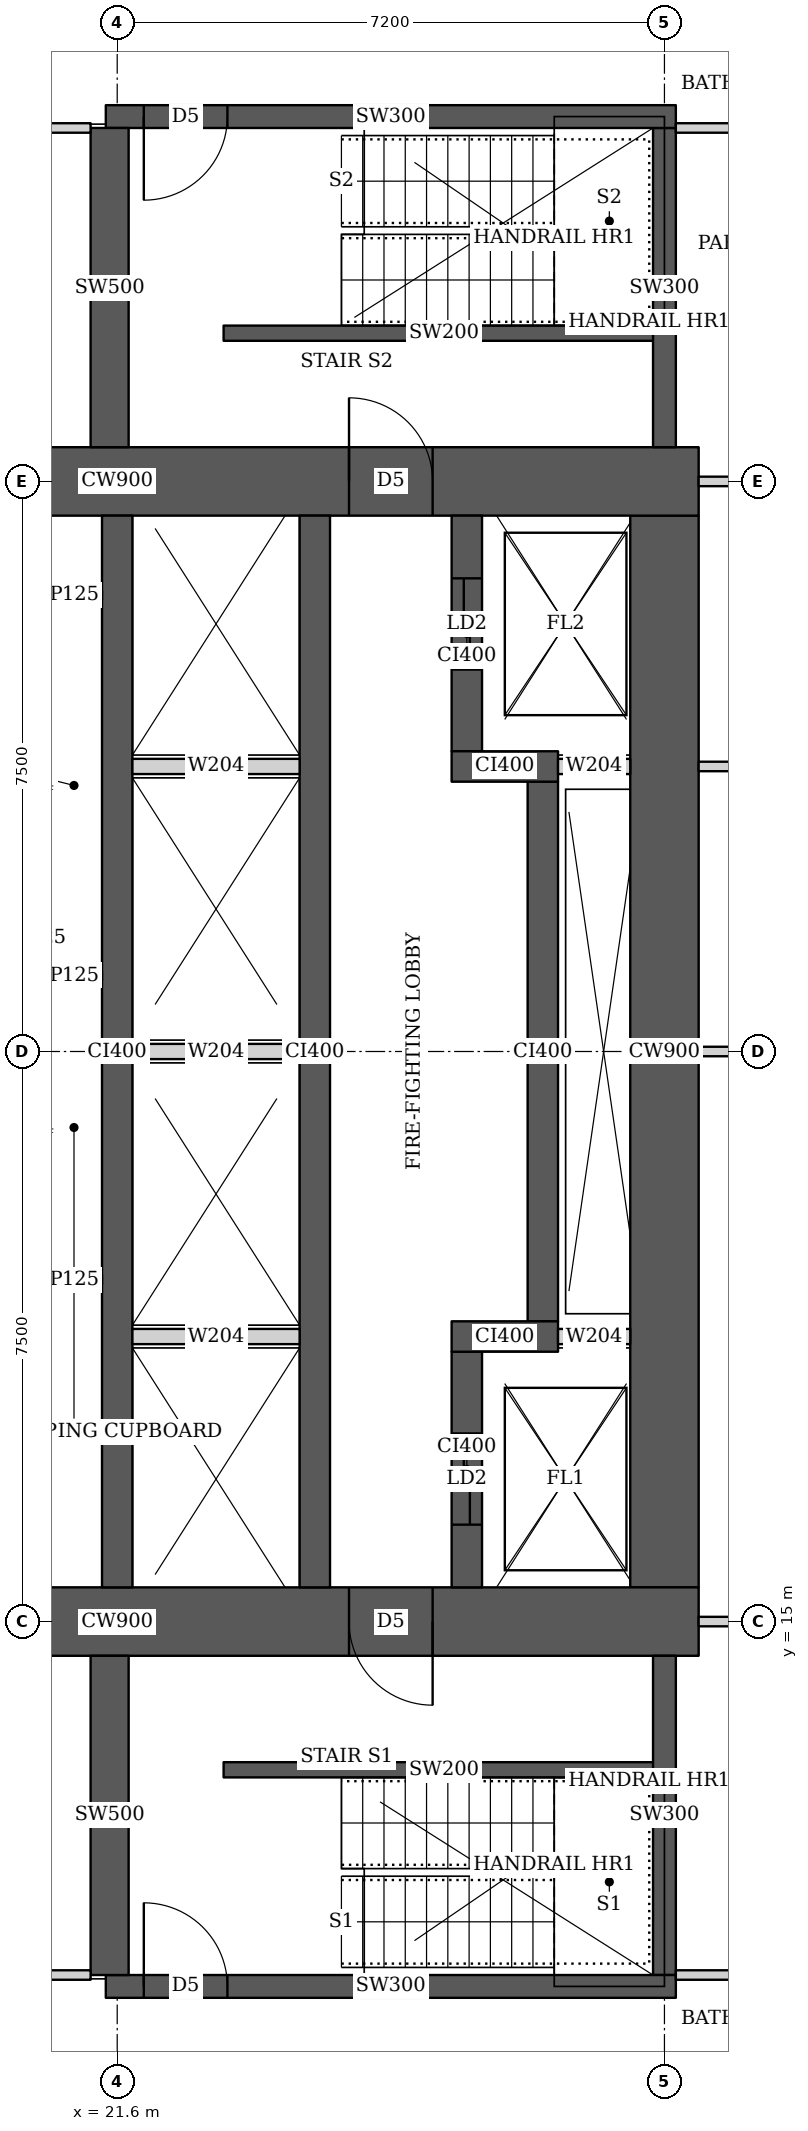
"""IFC4 building model, lengths in metres.
Left out: names, types, materials, properties, quantities, classifications, styles, units other than length and angle.
Written with IfcOpenShell. Run it as: python <this file> out.ifc"""

import sys

from ifc_helpers import new_model, si_unit, direction, frame, frame_2d, origin, place, context, subcontext, project, spatial, rectangle, extrude, element, fill, save


model = new_model("IFC4")
c1 = context("Model", 3, precision=1e-05, world=origin(), true_north=direction((0.0, 1.0)))
c2 = subcontext(c1, "Body", "Model", "MODEL_VIEW")
j1 = project(units=[si_unit("LENGTHUNIT", "METRE"), si_unit("PLANEANGLEUNIT", "RADIAN")], contexts=[c1])
p1 = place(None, origin())
s1 = spatial("IfcSite", under=j1, at=p1, CompositionType="ELEMENT")
p2 = place(p1, origin())
s2 = spatial("IfcBuilding", under=s1, at=p2, CompositionType="ELEMENT")
p3 = place(p2, frame((0.0, 0.0, 89.15)))
s3 = spatial("IfcBuildingStorey", under=s2, at=p3, CompositionType="ELEMENT", Elevation=89.15)
p4 = place(p3, frame((13.95, 15.0, 0.0), z_axis=(0.0, 0.0, 1.0), x_axis=(1.0, 0.0, 0.0)))
e1 = element("IfcWall", 1, at=p4, inside=s3, PredefinedType="SHEAR", context=c2, shape_type="SweptSolid", body=[
    extrude(rectangle(XDim=15.3, YDim=0.9, at=frame_2d((7.65, 0.0))), origin(), (0.0, 0.0, 1.0), 3.75),
])
p5 = place(p4, frame((4.45, 0.0, 0.0)))
e2 = element("IfcOpeningElement", 2, at=p5, cuts=e1, PredefinedType="OPENING", context=c2, shape_type="SweptSolid", body=[
    extrude(rectangle(XDim=1.8, YDim=2.1, at=frame_2d((0.9, 1.05))), frame((0.0, 0.46, 0.0), z_axis=(0.0, -1.0, 0.0), x_axis=(1.0, 0.0, 0.0)), (0.0, 0.0, 1.0), 0.92),
])
p6 = place(p4, frame((10.7, 0.0, 0.0)))
e3 = element("IfcOpeningElement", 3, at=p6, cuts=e1, PredefinedType="OPENING", context=c2, shape_type="SweptSolid", body=[
    extrude(rectangle(XDim=1.1, YDim=2.1, at=frame_2d((0.55, 1.05))), frame((0.0, 0.46, 0.0), z_axis=(0.0, -1.0, 0.0), x_axis=(1.0, 0.0, 0.0)), (0.0, 0.0, 1.0), 0.92),
])
p7 = place(p3, frame((13.95, 30.0, 0.0), z_axis=(0.0, 0.0, 1.0), x_axis=(1.0, 0.0, 0.0)))
e4 = element("IfcWall", 4, at=p7, inside=s3, PredefinedType="SHEAR", context=c2, shape_type="SweptSolid", body=[
    extrude(rectangle(XDim=15.3, YDim=0.9, at=frame_2d((7.65, 0.0))), origin(), (0.0, 0.0, 1.0), 3.75),
])
p8 = place(p7, frame((4.45, 0.0, 0.0)))
e5 = element("IfcOpeningElement", 5, at=p8, cuts=e4, PredefinedType="OPENING", context=c2, shape_type="SweptSolid", body=[
    extrude(rectangle(XDim=1.8, YDim=2.1, at=frame_2d((0.9, 1.05))), frame((0.0, 0.46, 0.0), z_axis=(0.0, -1.0, 0.0), x_axis=(1.0, 0.0, 0.0)), (0.0, 0.0, 1.0), 0.92),
])
p9 = place(p7, frame((10.7, 0.0, 0.0)))
e6 = element("IfcOpeningElement", 6, at=p9, cuts=e4, PredefinedType="OPENING", context=c2, shape_type="SweptSolid", body=[
    extrude(rectangle(XDim=1.1, YDim=2.1, at=frame_2d((0.55, 1.05))), frame((0.0, 0.46, 0.0), z_axis=(0.0, -1.0, 0.0), x_axis=(1.0, 0.0, 0.0)), (0.0, 0.0, 1.0), 0.92),
])
p10 = place(p3, frame((28.8, 15.45, 0.0), z_axis=(0.0, 0.0, 1.0), x_axis=(0.0, 1.0, 0.0)))
e7 = element("IfcWall", 7, at=p10, inside=s3, PredefinedType="SHEAR", context=c2, shape_type="SweptSolid", body=[
    extrude(rectangle(XDim=14.1, YDim=0.9, at=frame_2d((7.05, 0.0))), origin(), (0.0, 0.0, 1.0), 3.75),
])
for number, where, z_axis, x_axis in (
    (8, (21.6, 15.45, 0.0), (0.0, 0.0, 1.0), (0.0, 1.0, 0.0)),
    (9, (24.2, 15.45, 0.0), (0.0, 0.0, 1.0), (0.0, 1.0, 0.0)),
):
    element("IfcWall", number, at=place(p3, frame(where, z_axis=z_axis, x_axis=x_axis)), inside=s3, PredefinedType="SHEAR", context=c2, shape_type="SweptSolid", body=[
        extrude(rectangle(XDim=14.1, YDim=0.4, at=frame_2d((7.05, 0.0))), origin(), (0.0, 0.0, 1.0), 3.75),
    ])
p11 = place(p3, frame((26.2, 15.45, 0.0), z_axis=(0.0, 0.0, 1.0), x_axis=(0.0, 1.0, 0.0)))
e10 = element("IfcWall", 10, at=p11, inside=s3, PredefinedType="SHEAR", context=c2, shape_type="SweptSolid", body=[
    extrude(rectangle(XDim=3.1, YDim=0.4, at=frame_2d((1.55, 0.0))), origin(), (0.0, 0.0, 1.0), 3.75),
])
p12 = place(p11, frame((0.825, 0.0, 0.0)))
e11 = element("IfcOpeningElement", 11, at=p12, cuts=e10, PredefinedType="OPENING", context=c2, shape_type="SweptSolid", body=[
    extrude(rectangle(XDim=1.2, YDim=2.1, at=frame_2d((0.6, 1.05))), frame((0.0, 0.21, 0.0), z_axis=(0.0, -1.0, 0.0), x_axis=(1.0, 0.0, 0.0)), (0.0, 0.0, 1.0), 0.42),
])
p13 = place(p3, frame((26.0, 18.75, 0.0), z_axis=(0.0, 0.0, 1.0), x_axis=(1.0, 0.0, 0.0)))
e12 = element("IfcWall", 12, at=p13, inside=s3, PredefinedType="SHEAR", context=c2, shape_type="SweptSolid", body=[
    extrude(rectangle(XDim=1.4, YDim=0.4, at=frame_2d((0.7, 0.0))), origin(), (0.0, 0.0, 1.0), 3.75),
])
p14 = place(p3, frame((27.2, 18.95, 0.0), z_axis=(0.0, 0.0, 1.0), x_axis=(0.0, 1.0, 0.0)))
e13 = element("IfcWall", 13, at=p14, inside=s3, PredefinedType="SHEAR", context=c2, shape_type="SweptSolid", body=[
    extrude(rectangle(XDim=7.1, YDim=0.4, at=frame_2d((3.55, 0.0))), origin(), (0.0, 0.0, 1.0), 3.75),
])
p15 = place(p3, frame((26.0, 26.25, 0.0), z_axis=(0.0, 0.0, 1.0), x_axis=(1.0, 0.0, 0.0)))
e14 = element("IfcWall", 14, at=p15, inside=s3, PredefinedType="SHEAR", context=c2, shape_type="SweptSolid", body=[
    extrude(rectangle(XDim=1.4, YDim=0.4, at=frame_2d((0.7, 0.0))), origin(), (0.0, 0.0, 1.0), 3.75),
])
p16 = place(p3, frame((26.2, 26.45, 0.0), z_axis=(0.0, 0.0, 1.0), x_axis=(0.0, 1.0, 0.0)))
e15 = element("IfcWall", 15, at=p16, inside=s3, PredefinedType="SHEAR", context=c2, shape_type="SweptSolid", body=[
    extrude(rectangle(XDim=3.1, YDim=0.4, at=frame_2d((1.55, 0.0))), origin(), (0.0, 0.0, 1.0), 3.75),
])
p17 = place(p16, frame((1.075, 0.0, 0.0)))
e16 = element("IfcOpeningElement", 16, at=p17, cuts=e15, PredefinedType="OPENING", context=c2, shape_type="SweptSolid", body=[
    extrude(rectangle(XDim=1.2, YDim=2.1, at=frame_2d((0.6, 1.05))), frame((0.0, 0.21, 0.0), z_axis=(0.0, -1.0, 0.0), x_axis=(1.0, 0.0, 0.0)), (0.0, 0.0, 1.0), 0.42),
])
p18 = place(p3, frame((21.45, 10.2, 0.0), z_axis=(0.0, 0.0, 1.0), x_axis=(1.0, 0.0, 0.0)))
e17 = element("IfcWall", 17, at=p18, inside=s3, PredefinedType="SHEAR", context=c2, shape_type="SweptSolid", body=[
    extrude(rectangle(XDim=7.5, YDim=0.3, at=frame_2d((3.75, 0.0))), origin(), (0.0, 0.0, 1.0), 3.75),
])
p19 = place(p18, frame((0.5, 0.0, 0.0)))
e18 = element("IfcOpeningElement", 18, at=p19, cuts=e17, PredefinedType="OPENING", context=c2, shape_type="SweptSolid", body=[
    extrude(rectangle(XDim=1.1, YDim=2.1, at=frame_2d((0.55, 1.05))), frame((0.0, 0.16, 0.0), z_axis=(0.0, -1.0, 0.0), x_axis=(1.0, 0.0, 0.0)), (0.0, 0.0, 1.0), 0.32),
])
p20 = place(p3, frame((21.5, 10.35, 0.0), z_axis=(0.0, 0.0, 1.0), x_axis=(0.0, 1.0, 0.0)))
e19 = element("IfcWall", 19, at=p20, inside=s3, PredefinedType="SHEAR", context=c2, shape_type="SweptSolid", body=[
    extrude(rectangle(XDim=4.2, YDim=0.5, at=frame_2d((2.1, 0.0))), origin(), (0.0, 0.0, 1.0), 3.75),
])
p21 = place(p3, frame((28.8, 10.35, 0.0), z_axis=(0.0, 0.0, 1.0), x_axis=(0.0, 1.0, 0.0)))
e20 = element("IfcWall", 20, at=p21, inside=s3, PredefinedType="SHEAR", context=c2, shape_type="SweptSolid", body=[
    extrude(rectangle(XDim=4.2, YDim=0.3, at=frame_2d((2.1, 0.0))), origin(), (0.0, 0.0, 1.0), 3.75),
])
p22 = place(p3, frame((21.45, 34.8, 0.0), z_axis=(0.0, 0.0, 1.0), x_axis=(1.0, 0.0, 0.0)))
e21 = element("IfcWall", 21, at=p22, inside=s3, PredefinedType="SHEAR", context=c2, shape_type="SweptSolid", body=[
    extrude(rectangle(XDim=7.5, YDim=0.3, at=frame_2d((3.75, 0.0))), origin(), (0.0, 0.0, 1.0), 3.75),
])
p23 = place(p22, frame((0.5, 0.0, 0.0)))
e22 = element("IfcOpeningElement", 22, at=p23, cuts=e21, PredefinedType="OPENING", context=c2, shape_type="SweptSolid", body=[
    extrude(rectangle(XDim=1.1, YDim=2.1, at=frame_2d((0.55, 1.05))), frame((0.0, 0.16, 0.0), z_axis=(0.0, -1.0, 0.0), x_axis=(1.0, 0.0, 0.0)), (0.0, 0.0, 1.0), 0.32),
])
p24 = place(p3, frame((21.5, 30.45, 0.0), z_axis=(0.0, 0.0, 1.0), x_axis=(0.0, 1.0, 0.0)))
e23 = element("IfcWall", 23, at=p24, inside=s3, PredefinedType="SHEAR", context=c2, shape_type="SweptSolid", body=[
    extrude(rectangle(XDim=4.2, YDim=0.5, at=frame_2d((2.1, 0.0))), origin(), (0.0, 0.0, 1.0), 3.75),
])
p25 = place(p3, frame((28.8, 30.45, 0.0), z_axis=(0.0, 0.0, 1.0), x_axis=(0.0, 1.0, 0.0)))
e24 = element("IfcWall", 24, at=p25, inside=s3, PredefinedType="SHEAR", context=c2, shape_type="SweptSolid", body=[
    extrude(rectangle(XDim=4.2, YDim=0.3, at=frame_2d((2.1, 0.0))), origin(), (0.0, 0.0, 1.0), 3.75),
])
p26 = place(p3, frame((10.413, 10.35, 0.0), z_axis=(0.0, 0.0, 1.0), x_axis=(1.0, 0.0, 0.0)))
e25 = element("IfcWall", 25, at=p26, inside=s3, PredefinedType="PARTITIONING", context=c2, shape_type="SweptSolid", body=[
    extrude(rectangle(XDim=10.837, YDim=0.125, at=frame_2d((5.418, 0.0))), origin(), (0.0, 0.0, 1.0), 3.5),
])
p27 = place(p26, frame((7.582, 0.0, 0.0)))
e26 = element("IfcOpeningElement", 26, at=p27, cuts=e25, PredefinedType="OPENING", context=c2, shape_type="SweptSolid", body=[
    extrude(rectangle(XDim=1.8, YDim=2.1, at=frame_2d((0.9, 1.05))), frame((0.0, 0.073, 0.0), z_axis=(0.0, -1.0, 0.0), x_axis=(1.0, 0.0, 0.0)), (0.0, 0.0, 1.0), 0.145),
])
p28 = place(p3, frame((10.413, 34.65, 0.0), z_axis=(0.0, 0.0, 1.0), x_axis=(1.0, 0.0, 0.0)))
e27 = element("IfcWall", 27, at=p28, inside=s3, PredefinedType="PARTITIONING", context=c2, shape_type="SweptSolid", body=[
    extrude(rectangle(XDim=10.837, YDim=0.125, at=frame_2d((5.418, 0.0))), origin(), (0.0, 0.0, 1.0), 3.5),
])
p29 = place(p28, frame((7.487, 0.0, 0.0)))
e28 = element("IfcOpeningElement", 28, at=p29, cuts=e27, PredefinedType="OPENING", context=c2, shape_type="SweptSolid", body=[
    extrude(rectangle(XDim=1.8, YDim=2.1, at=frame_2d((0.9, 1.05))), frame((0.0, 0.073, 0.0), z_axis=(0.0, -1.0, 0.0), x_axis=(1.0, 0.0, 0.0)), (0.0, 0.0, 1.0), 0.145),
])
p30 = place(p3, frame((28.95, 10.35, 0.0), z_axis=(0.0, 0.0, 1.0), x_axis=(1.0, 0.0, 0.0)))
e29 = element("IfcWall", 29, at=p30, inside=s3, PredefinedType="PARTITIONING", context=c2, shape_type="SweptSolid", body=[
    extrude(rectangle(XDim=8.886, YDim=0.125, at=frame_2d((4.443, 0.0))), origin(), (0.0, 0.0, 1.0), 3.5),
])
p31 = place(p3, frame((28.95, 34.65, 0.0), z_axis=(0.0, 0.0, 1.0), x_axis=(1.0, 0.0, 0.0)))
e30 = element("IfcWall", 30, at=p31, inside=s3, PredefinedType="PARTITIONING", context=c2, shape_type="SweptSolid", body=[
    extrude(rectangle(XDim=4.381, YDim=0.125, at=frame_2d((2.19, 0.0))), origin(), (0.0, 0.0, 1.0), 3.5),
])
p32 = place(p3, frame((29.25, 15.0, 0.0), z_axis=(0.0, 0.0, 1.0), x_axis=(1.0, 0.0, 0.0)))
e31 = element("IfcWall", 31, at=p32, inside=s3, PredefinedType="PARTITIONING", context=c2, shape_type="SweptSolid", body=[
    extrude(rectangle(XDim=5.949, YDim=0.125, at=frame_2d((2.975, 0.0))), origin(), (0.0, 0.0, 1.0), 3.5),
])
p33 = place(p3, frame((29.25, 22.5, 0.0), z_axis=(0.0, 0.0, 1.0), x_axis=(1.0, 0.0, 0.0)))
e32 = element("IfcWall", 32, at=p33, inside=s3, PredefinedType="PARTITIONING", context=c2, shape_type="SweptSolid", body=[
    extrude(rectangle(XDim=2.949, YDim=0.125, at=frame_2d((1.475, 0.0))), origin(), (0.0, 0.0, 1.0), 3.5),
])
p34 = place(p3, frame((29.25, 26.25, 0.0), z_axis=(0.0, 0.0, 1.0), x_axis=(1.0, 0.0, 0.0)))
e33 = element("IfcWall", 33, at=p34, inside=s3, PredefinedType="PARTITIONING", context=c2, shape_type="SweptSolid", body=[
    extrude(rectangle(XDim=5.583, YDim=0.125, at=frame_2d((2.792, 0.0))), origin(), (0.0, 0.0, 1.0), 3.5),
])
p35 = place(p3, frame((29.25, 30.0, 0.0), z_axis=(0.0, 0.0, 1.0), x_axis=(1.0, 0.0, 0.0)))
e34 = element("IfcWall", 34, at=p35, inside=s3, PredefinedType="PARTITIONING", context=c2, shape_type="SweptSolid", body=[
    extrude(rectangle(XDim=2.949, YDim=0.125, at=frame_2d((1.475, 0.0))), origin(), (0.0, 0.0, 1.0), 3.5),
])
for number, where, z_axis, x_axis in (
    (35, (20.663, 19.5, 0.0), (0.0, 0.0, 1.0), (1.0, 0.0, 0.0)),
    (36, (20.663, 28.5, 0.0), (0.0, 0.0, 1.0), (1.0, 0.0, 0.0)),
    (37, (20.663, 23.5, 0.0), (0.0, 0.0, 1.0), (1.0, 0.0, 0.0)),
):
    element("IfcWall", number, at=place(p3, frame(where, z_axis=z_axis, x_axis=x_axis)), inside=s3, PredefinedType="PARTITIONING", context=c2, shape_type="SweptSolid", body=[
        extrude(rectangle(XDim=0.737, YDim=0.125, at=frame_2d((0.368, 0.0))), origin(), (0.0, 0.0, 1.0), 3.5),
    ])
for number, where, z_axis, x_axis in (
    (38, (23.0, 13.05, 0.0), (0.0, 0.0, 1.0), (1.0, 0.0, 0.0)),
    (39, (23.0, 31.95, 0.0), (0.0, 0.0, 1.0), (1.0, 0.0, 0.0)),
):
    element("IfcWall", number, at=place(p3, frame(where, z_axis=z_axis, x_axis=x_axis)), inside=s3, PredefinedType="SHEAR", context=c2, shape_type="SweptSolid", body=[
        extrude(rectangle(XDim=5.8, YDim=0.2, at=frame_2d((2.9, 0.0))), origin(), (0.0, 0.0, 1.0), 3.75),
    ])
for number, where, z_axis, x_axis in (
    (40, (21.8, 18.75, 0.0), (0.0, 0.0, 1.0), (1.0, 0.0, 0.0)),
    (41, (21.8, 22.5, 0.0), (0.0, 0.0, 1.0), (1.0, 0.0, 0.0)),
    (42, (21.8, 26.25, 0.0), (0.0, 0.0, 1.0), (1.0, 0.0, 0.0)),
):
    element("IfcWall", number, at=place(p3, frame(where, z_axis=z_axis, x_axis=x_axis)), inside=s3, PredefinedType="SOLIDWALL", context=c2, shape_type="SweptSolid", body=[
        extrude(rectangle(XDim=2.2, YDim=0.2, at=frame_2d((1.1, 0.0))), origin(), (0.0, 0.0, 1.0), 3.5),
    ])
for number, where, z_axis, x_axis in (
    (43, (27.4, 18.75, 0.0), (0.0, 0.0, 1.0), (1.0, 0.0, 0.0)),
    (44, (27.4, 26.25, 0.0), (0.0, 0.0, 1.0), (1.0, 0.0, 0.0)),
):
    element("IfcWall", number, at=place(p3, frame(where, z_axis=z_axis, x_axis=x_axis)), inside=s3, PredefinedType="SOLIDWALL", context=c2, shape_type="SweptSolid", body=[
        extrude(rectangle(XDim=0.95, YDim=0.2, at=frame_2d((0.475, 0.0))), origin(), (0.0, 0.0, 1.0), 3.5),
    ])
p36 = place(p6, origin())
e45 = element("IfcDoor", 45, at=p36, inside=s3, OperationType="SINGLE_SWING_LEFT", PredefinedType="DOOR", context=c2, shape_type="SweptSolid", body=[
    extrude(rectangle(XDim=1.1, YDim=2.1, at=frame_2d((0.55, 1.05))), frame((0.0, 0.025, 0.0), z_axis=(0.0, -1.0, 0.0), x_axis=(1.0, 0.0, 0.0)), (0.0, 0.0, 1.0), 0.05),
])
fill(e3, e45)
p37 = place(p9, origin())
e46 = element("IfcDoor", 46, at=p37, inside=s3, OperationType="SINGLE_SWING_LEFT", PredefinedType="DOOR", context=c2, shape_type="SweptSolid", body=[
    extrude(rectangle(XDim=1.1, YDim=2.1, at=frame_2d((0.55, 1.05))), frame((0.0, 0.025, 0.0), z_axis=(0.0, -1.0, 0.0), x_axis=(1.0, 0.0, 0.0)), (0.0, 0.0, 1.0), 0.05),
])
fill(e6, e46)
p38 = place(p12, origin())
e47 = element("IfcDoor", 47, at=p38, inside=s3, OperationType="DOUBLE_DOOR_SLIDING", PredefinedType="DOOR", context=c2, shape_type="SweptSolid", body=[
    extrude(rectangle(XDim=1.2, YDim=2.1, at=frame_2d((0.6, 1.05))), frame((0.0, 0.025, 0.0), z_axis=(0.0, -1.0, 0.0), x_axis=(1.0, 0.0, 0.0)), (0.0, 0.0, 1.0), 0.05),
])
fill(e11, e47)
p39 = place(p17, origin())
e48 = element("IfcDoor", 48, at=p39, inside=s3, OperationType="DOUBLE_DOOR_SLIDING", PredefinedType="DOOR", context=c2, shape_type="SweptSolid", body=[
    extrude(rectangle(XDim=1.2, YDim=2.1, at=frame_2d((0.6, 1.05))), frame((0.0, 0.025, 0.0), z_axis=(0.0, -1.0, 0.0), x_axis=(1.0, 0.0, 0.0)), (0.0, 0.0, 1.0), 0.05),
])
fill(e16, e48)
p40 = place(p19, origin())
e49 = element("IfcDoor", 49, at=p40, inside=s3, OperationType="SINGLE_SWING_LEFT", PredefinedType="DOOR", context=c2, shape_type="SweptSolid", body=[
    extrude(rectangle(XDim=1.1, YDim=2.1, at=frame_2d((0.55, 1.05))), frame((0.0, 0.025, 0.0), z_axis=(0.0, -1.0, 0.0), x_axis=(1.0, 0.0, 0.0)), (0.0, 0.0, 1.0), 0.05),
])
fill(e18, e49)
p41 = place(p23, origin())
e50 = element("IfcDoor", 50, at=p41, inside=s3, OperationType="SINGLE_SWING_RIGHT", PredefinedType="DOOR", context=c2, shape_type="SweptSolid", body=[
    extrude(rectangle(XDim=1.1, YDim=2.1, at=frame_2d((0.55, 1.05))), frame((0.0, 0.025, 0.0), z_axis=(0.0, -1.0, 0.0), x_axis=(1.0, 0.0, 0.0)), (0.0, 0.0, 1.0), 0.05),
])
fill(e22, e50)
save(model, sys.argv[1])
